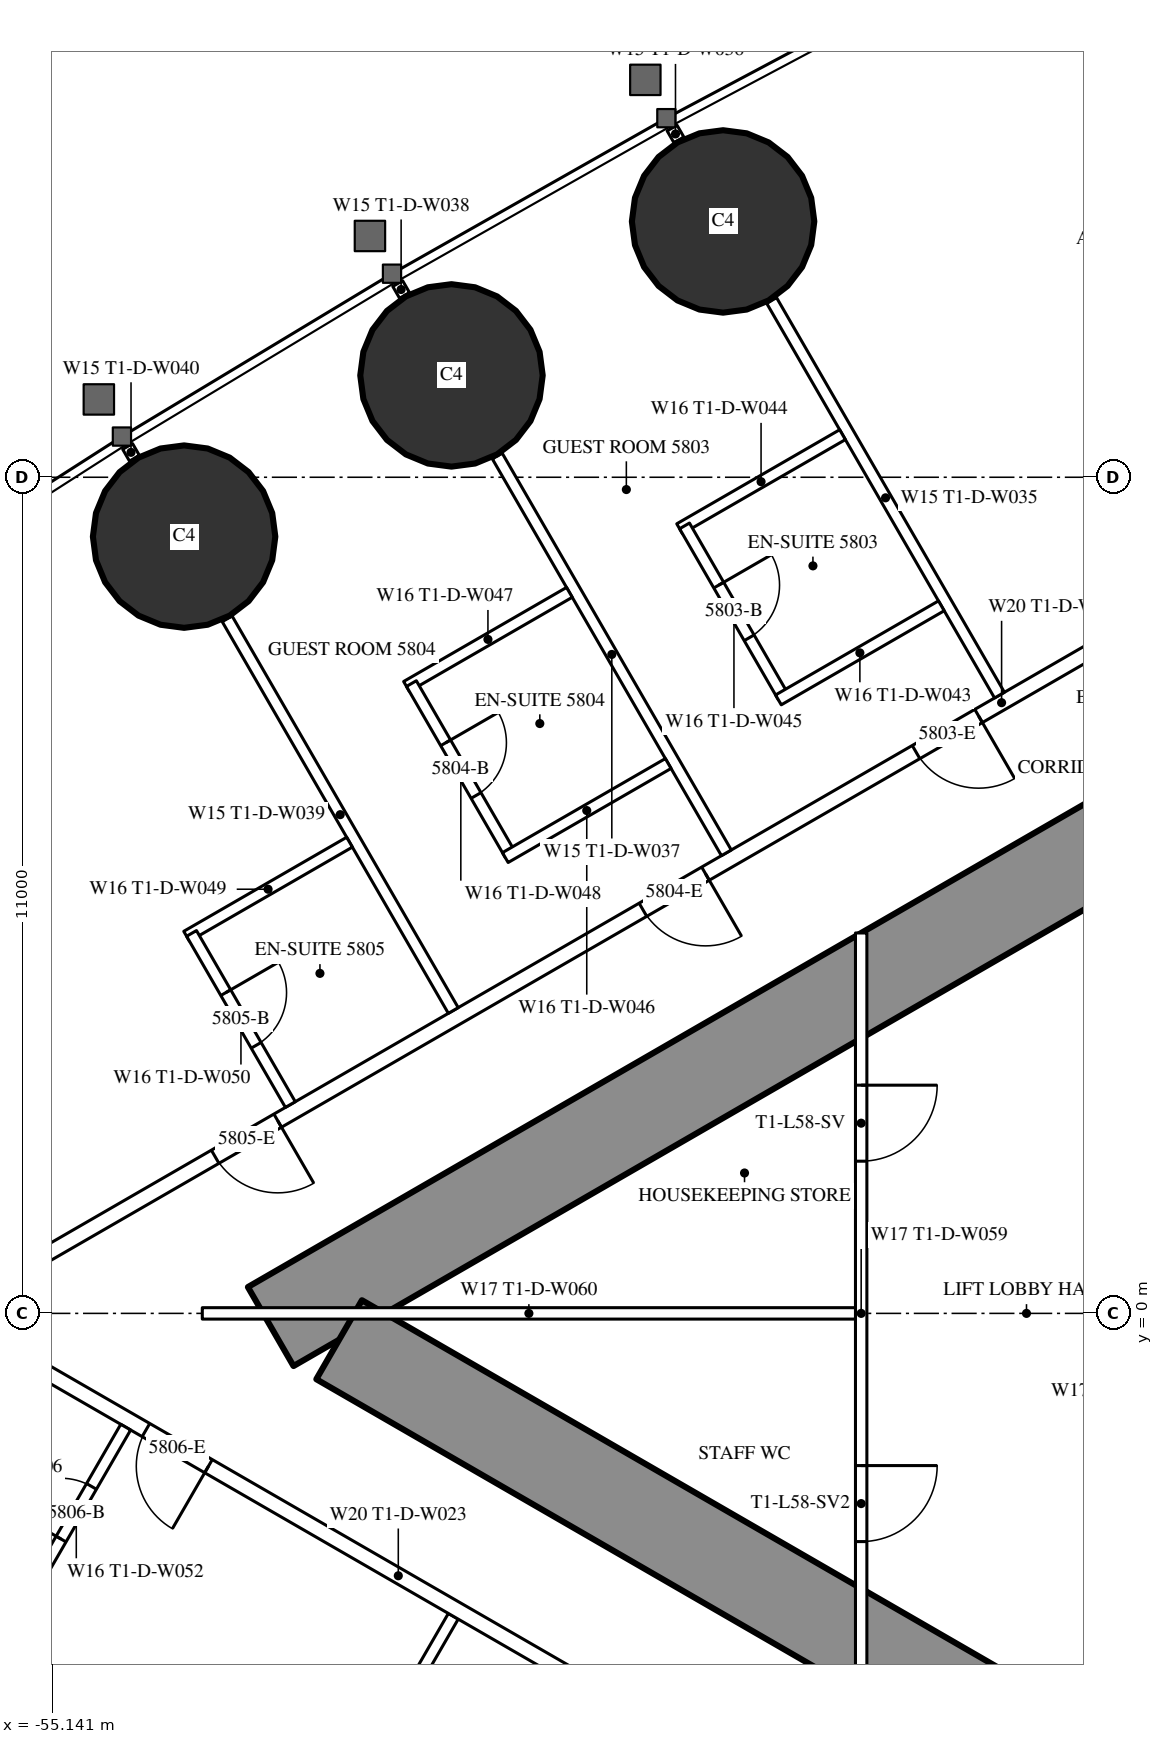
"""IFC4 building model, lengths in metres.
Left out: names, types, materials, properties, quantities, classifications, styles, units other than length and angle.
Written with IfcOpenShell. Run it as: python <this file> out.ifc"""

import sys

from ifc_helpers import new_model, si_unit, direction, frame, frame_2d, origin, origin_2d, place, context, subcontext, project, spatial, rectangle, circle, extrude, element, fill, save


model = new_model("IFC4")
c1 = context("Model", 3, precision=1e-05, world=origin(), true_north=direction((0.0, 1.0)))
c2 = subcontext(c1, "Body", "Model", "MODEL_VIEW")
j1 = project(units=[si_unit("LENGTHUNIT", "METRE"), si_unit("PLANEANGLEUNIT", "RADIAN")], contexts=[c1])
p1 = place(None, origin())
s1 = spatial("IfcSite", under=j1, at=p1, CompositionType="ELEMENT")
p2 = place(p1, origin())
s2 = spatial("IfcBuilding", under=s1, at=p2, CompositionType="ELEMENT")
p3 = place(p2, frame((0.0, 0.0, 218.9)))
s3 = spatial("IfcBuildingStorey", under=s2, at=p3, CompositionType="ELEMENT", Elevation=218.9)
for number, where, z_axis, x_axis in (
    (1, (-46.317, 14.365, 0.0), (0.0, 0.0, 1.0), (1.0, 0.0, 0.0)),
    (2, (-49.89, 12.34, 0.0), (0.0, 0.0, 1.0), (1.0, 0.0, 0.0)),
    (3, (-53.408, 10.219, 0.0), (0.0, 0.0, 1.0), (1.0, 0.0, 0.0)),
):
    element("IfcColumn", number, at=place(p3, frame(where, z_axis=z_axis, x_axis=x_axis)), inside=s3, PredefinedType="COLUMN", context=c2, shape_type="SweptSolid", body=[
        extrude(circle(Radius=1.2, at=origin_2d()), origin(), (0.0, 0.0, 1.0), 3.6),
    ])
p4 = place(p3, frame((-27.2, 14.3, 0.0), z_axis=(0.0, 0.0, 1.0), x_axis=(-0.866026593062, -0.499997940104, 0.0)))
e4 = element("IfcWall", 4, at=p4, inside=s3, PredefinedType="SHEAR", context=c2, shape_type="SweptSolid", body=[
    extrude(rectangle(XDim=28.946, YDim=1.2, at=frame_2d((14.473, 0.0))), origin(), (0.0, 0.0, 1.0), 3.6),
])
p5 = place(p4, frame((4.6, 0.0, 0.0)))
e5 = element("IfcOpeningElement", 5, at=p5, cuts=e4, PredefinedType="OPENING", context=c2, shape_type="SweptSolid", body=[
    extrude(rectangle(XDim=1.0, YDim=2.2, at=frame_2d((0.5, 1.1))), frame((0.0, 0.61, 0.0), z_axis=(0.0, -1.0, 0.0), x_axis=(1.0, 0.0, 0.0)), (0.0, 0.0, 1.0), 1.22),
])
p6 = place(p4, frame((13.395, 0.0, 0.0)))
e6 = element("IfcOpeningElement", 6, at=p6, cuts=e4, PredefinedType="OPENING", context=c2, shape_type="SweptSolid", body=[
    extrude(rectangle(XDim=1.8, YDim=2.2, at=frame_2d((0.9, 1.1))), frame((0.0, 0.61, 0.0), z_axis=(0.0, -1.0, 0.0), x_axis=(1.0, 0.0, 0.0)), (0.0, 0.0, 1.0), 1.22),
])
p7 = place(p3, frame((-27.2, -14.3, 0.0), z_axis=(0.0, 0.0, 1.0), x_axis=(-0.866024021859, 0.500002393557, 0.0)))
e7 = element("IfcWall", 7, at=p7, inside=s3, PredefinedType="SHEAR", context=c2, shape_type="SweptSolid", body=[
    extrude(rectangle(XDim=27.907, YDim=1.2, at=frame_2d((13.954, 0.0))), origin(), (0.0, 0.0, 1.0), 3.6),
])
p8 = place(p7, frame((4.6, 0.0, 0.0)))
e8 = element("IfcOpeningElement", 8, at=p8, cuts=e7, PredefinedType="OPENING", context=c2, shape_type="SweptSolid", body=[
    extrude(rectangle(XDim=1.0, YDim=2.2, at=frame_2d((0.5, 1.1))), frame((0.0, 0.61, 0.0), z_axis=(0.0, -1.0, 0.0), x_axis=(1.0, 0.0, 0.0)), (0.0, 0.0, 1.0), 1.22),
])
p9 = place(p7, frame((13.395, 0.0, 0.0)))
e9 = element("IfcOpeningElement", 9, at=p9, cuts=e7, PredefinedType="OPENING", context=c2, shape_type="SweptSolid", body=[
    extrude(rectangle(XDim=1.8, YDim=2.2, at=frame_2d((0.9, 1.1))), frame((0.0, 0.61, 0.0), z_axis=(0.0, -1.0, 0.0), x_axis=(1.0, 0.0, 0.0)), (0.0, 0.0, 1.0), 1.22),
])
p10 = place(p3, frame((-28.737, 16.068, 0.0), z_axis=(0.0, 0.0, 1.0), x_axis=(-0.866026057212, -0.499998868229, 0.0)))
e10 = element("IfcWall", 10, at=p10, inside=s3, PredefinedType="PARTITIONING", context=c2, shape_type="SweptSolid", body=[
    extrude(rectangle(XDim=32.137, YDim=0.2, at=frame_2d((16.068, 0.0))), origin(), (0.0, 0.0, 1.0), 3.35),
])
p11 = place(p10, frame((1.08, 0.0, 0.0)))
e11 = element("IfcOpeningElement", 11, at=p11, cuts=e10, PredefinedType="OPENING", context=c2, shape_type="SweptSolid", body=[
    extrude(rectangle(XDim=1.8, YDim=2.03, at=frame_2d((0.9, 1.015))), frame((0.0, 0.11, 0.0), z_axis=(0.0, -1.0, 0.0), x_axis=(1.0, 0.0, 0.0)), (0.0, 0.0, 1.0), 0.22),
])
p12 = place(p10, frame((6.86, 0.0, 0.0)))
e12 = element("IfcOpeningElement", 12, at=p12, cuts=e10, PredefinedType="OPENING", context=c2, shape_type="SweptSolid", body=[
    extrude(rectangle(XDim=1.0, YDim=2.2, at=frame_2d((0.5, 1.1))), frame((0.0, 0.11, 0.0), z_axis=(0.0, -1.0, 0.0), x_axis=(1.0, 0.0, 0.0)), (0.0, 0.0, 1.0), 0.22),
])
p13 = place(p10, frame((16.418, 0.0, 0.0)))
e13 = element("IfcOpeningElement", 13, at=p13, cuts=e10, PredefinedType="OPENING", context=c2, shape_type="SweptSolid", body=[
    extrude(rectangle(XDim=0.95, YDim=2.2, at=frame_2d((0.475, 1.1))), frame((0.0, 0.11, 0.0), z_axis=(0.0, -1.0, 0.0), x_axis=(1.0, 0.0, 0.0)), (0.0, 0.0, 1.0), 0.22),
])
p14 = place(p10, frame((20.567, 0.0, 0.0)))
e14 = element("IfcOpeningElement", 14, at=p14, cuts=e10, PredefinedType="OPENING", context=c2, shape_type="SweptSolid", body=[
    extrude(rectangle(XDim=0.95, YDim=2.2, at=frame_2d((0.475, 1.1))), frame((0.0, 0.11, 0.0), z_axis=(0.0, -1.0, 0.0), x_axis=(1.0, 0.0, 0.0)), (0.0, 0.0, 1.0), 0.22),
])
p15 = place(p10, frame((27.065, 0.0, 0.0)))
e15 = element("IfcOpeningElement", 15, at=p15, cuts=e10, PredefinedType="OPENING", context=c2, shape_type="SweptSolid", body=[
    extrude(rectangle(XDim=0.95, YDim=2.2, at=frame_2d((0.475, 1.1))), frame((0.0, 0.11, 0.0), z_axis=(0.0, -1.0, 0.0), x_axis=(1.0, 0.0, 0.0)), (0.0, 0.0, 1.0), 0.22),
])
p16 = place(p3, frame((-42.68, 8.134, 0.0), z_axis=(0.0, 0.0, 1.0), x_axis=(-0.499984479505, 0.866034364361, 0.0)))
e16 = element("IfcWall", 16, at=p16, inside=s3, PredefinedType="PARTITIONING", context=c2, shape_type="SweptSolid", body=[
    extrude(rectangle(XDim=5.995, YDim=0.15, at=frame_2d((2.998, 0.0))), origin(), (0.0, 0.0, 1.0), 2.45),
])
p17 = place(p3, frame((-46.898, 15.439, 0.0), z_axis=(0.0, 0.0, 1.0), x_axis=(-0.500232303069, 0.865891241997, 0.0)))
e17 = element("IfcWall", 17, at=p17, inside=s3, PredefinedType="PARTITIONING", context=c2, shape_type="SweptSolid", body=[
    extrude(rectangle(XDim=0.18, YDim=0.15, at=frame_2d((0.09, 0.0))), origin(), (0.0, 0.0, 1.0), 2.45),
])
p18 = place(p3, frame((-46.274, 6.059, 0.0), z_axis=(0.0, 0.0, 1.0), x_axis=(-0.500020471368, 0.866013584312, 0.0)))
e18 = element("IfcWall", 18, at=p18, inside=s3, PredefinedType="PARTITIONING", context=c2, shape_type="SweptSolid", body=[
    extrude(rectangle(XDim=6.028, YDim=0.15, at=frame_2d((3.014, 0.0))), origin(), (0.0, 0.0, 1.0), 2.45),
])
p19 = place(p3, frame((-50.508, 13.392, 0.0), z_axis=(0.0, 0.0, 1.0), x_axis=(-0.499644091975, 0.866230789891, 0.0)))
e19 = element("IfcWall", 19, at=p19, inside=s3, PredefinedType="PARTITIONING", context=c2, shape_type="SweptSolid", body=[
    extrude(rectangle(XDim=0.18, YDim=0.15, at=frame_2d((0.09, 0.0))), origin(), (0.0, 0.0, 1.0), 2.45),
])
p20 = place(p3, frame((-49.866, 3.985, 0.0), z_axis=(0.0, 0.0, 1.0), x_axis=(-0.500000694566, 0.866025002776, 0.0)))
e20 = element("IfcWall", 20, at=p20, inside=s3, PredefinedType="PARTITIONING", context=c2, shape_type="SweptSolid", body=[
    extrude(rectangle(XDim=5.95, YDim=0.15, at=frame_2d((2.975, 0.0))), origin(), (0.0, 0.0, 1.0), 2.45),
])
p21 = place(p3, frame((-54.061, 11.25, 0.0), z_axis=(0.0, 0.0, 1.0), x_axis=(-0.500391173478, 0.865799441849, 0.0)))
e21 = element("IfcWall", 21, at=p21, inside=s3, PredefinedType="PARTITIONING", context=c2, shape_type="SweptSolid", body=[
    extrude(rectangle(XDim=0.179, YDim=0.15, at=frame_2d((0.089, 0.0))), origin(), (0.0, 0.0, 1.0), 2.45),
])
p22 = place(p3, frame((-49.866, -3.985, 0.0), z_axis=(0.0, 0.0, 1.0), x_axis=(-0.500000694566, -0.866025002776, 0.0)))
e22 = element("IfcWall", 22, at=p22, inside=s3, PredefinedType="PARTITIONING", context=c2, shape_type="SweptSolid", body=[
    extrude(rectangle(XDim=5.95, YDim=0.15, at=frame_2d((2.975, 0.0))), origin(), (0.0, 0.0, 1.0), 2.45),
])
p23 = place(p22, frame((3.5, 0.0, 0.0)))
e23 = element("IfcOpeningElement", 23, at=p23, cuts=e22, PredefinedType="OPENING", context=c2, shape_type="SweptSolid", body=[
    extrude(rectangle(XDim=0.9, YDim=2.2, at=frame_2d((0.45, 1.1))), frame((0.0, 0.085, 0.0), z_axis=(0.0, -1.0, 0.0), x_axis=(1.0, 0.0, 0.0)), (0.0, 0.0, 1.0), 0.17),
])
p24 = place(p3, frame((-44.715, -6.844, 0.0), z_axis=(0.0, 0.0, 1.0), x_axis=(-0.866025261224, 0.500000246922, 0.0)))
e24 = element("IfcWall", 24, at=p24, inside=s3, PredefinedType="PARTITIONING", context=c2, shape_type="SweptSolid", body=[
    extrude(rectangle(XDim=13.567, YDim=0.2, at=frame_2d((6.783, 0.0))), origin(), (0.0, 0.0, 1.0), 3.35),
])
p25 = place(p24, frame((9.667, 0.0, 0.0)))
e25 = element("IfcOpeningElement", 25, at=p25, cuts=e24, PredefinedType="OPENING", context=c2, shape_type="SweptSolid", body=[
    extrude(rectangle(XDim=0.95, YDim=2.2, at=frame_2d((0.475, 1.1))), frame((0.0, 0.11, 0.0), z_axis=(0.0, -1.0, 0.0), x_axis=(1.0, 0.0, 0.0)), (0.0, 0.0, 1.0), 0.22),
])
p26 = place(p24, frame((2.117, 0.0, 0.0)))
e26 = element("IfcOpeningElement", 26, at=p26, cuts=e24, PredefinedType="OPENING", context=c2, shape_type="SweptSolid", body=[
    extrude(rectangle(XDim=0.95, YDim=2.2, at=frame_2d((0.475, 1.1))), frame((0.0, 0.11, 0.0), z_axis=(0.0, -1.0, 0.0), x_axis=(1.0, 0.0, 0.0)), (0.0, 0.0, 1.0), 0.22),
])
p27 = place(p24, frame((0.5, 0.0, 0.0)))
e27 = element("IfcOpeningElement", 27, at=p27, cuts=e24, PredefinedType="OPENING", context=c2, shape_type="SweptSolid", body=[
    extrude(rectangle(XDim=0.967, YDim=2.2, at=frame_2d((0.483, 1.1))), frame((0.0, 0.11, 0.0), z_axis=(0.0, -1.0, 0.0), x_axis=(1.0, 0.0, 0.0)), (0.0, 0.0, 1.0), 0.22),
])
p28 = place(p3, frame((-44.745, 11.56, 0.0), z_axis=(0.0, 0.0, 1.0), x_axis=(-0.866006523861, -0.500032699561, 0.0)))
e28 = element("IfcWall", 28, at=p28, inside=s3, PredefinedType="PARTITIONING", context=c2, shape_type="SweptSolid", body=[
    extrude(rectangle(XDim=2.475, YDim=0.15, at=frame_2d((1.237, 0.0))), origin(), (0.0, 0.0, 1.0), 3.35),
])
p29 = place(p3, frame((-45.524, 8.109, 0.0), z_axis=(0.0, 0.0, 1.0), x_axis=(-0.49997716683, 0.86603858612, 0.0)))
e29 = element("IfcWall", 29, at=p29, inside=s3, PredefinedType="PARTITIONING", context=c2, shape_type="SweptSolid", body=[
    extrude(rectangle(XDim=2.6, YDim=0.15, at=frame_2d((1.3, 0.0))), origin(), (0.0, 0.0, 1.0), 3.35),
])
p30 = place(p29, frame((0.9, 0.0, 0.0)))
e30 = element("IfcOpeningElement", 30, at=p30, cuts=e29, PredefinedType="OPENING", context=c2, shape_type="SweptSolid", body=[
    extrude(rectangle(XDim=0.8, YDim=2.2, at=frame_2d((0.4, 1.1))), frame((0.0, 0.085, 0.0), z_axis=(0.0, -1.0, 0.0), x_axis=(1.0, 0.0, 0.0)), (0.0, 0.0, 1.0), 0.17),
])
p31 = place(p3, frame((-43.445, 9.309, 0.0), z_axis=(0.0, 0.0, 1.0), x_axis=(-0.866031185235, -0.4999899861, 0.0)))
e31 = element("IfcWall", 31, at=p31, inside=s3, PredefinedType="PARTITIONING", context=c2, shape_type="SweptSolid", body=[
    extrude(rectangle(XDim=2.475, YDim=0.15, at=frame_2d((1.238, 0.0))), origin(), (0.0, 0.0, 1.0), 3.35),
])
p32 = place(p3, frame((-48.339, 9.486, 0.0), z_axis=(0.0, 0.0, 1.0), x_axis=(-0.866006523861, -0.500032699561, 0.0)))
e32 = element("IfcWall", 32, at=p32, inside=s3, PredefinedType="PARTITIONING", context=c2, shape_type="SweptSolid", body=[
    extrude(rectangle(XDim=2.475, YDim=0.15, at=frame_2d((1.237, 0.0))), origin(), (0.0, 0.0, 1.0), 3.35),
])
p33 = place(p3, frame((-49.117, 6.034, 0.0), z_axis=(0.0, 0.0, 1.0), x_axis=(-0.500006934395, 0.866021400173, 0.0)))
e33 = element("IfcWall", 33, at=p33, inside=s3, PredefinedType="PARTITIONING", context=c2, shape_type="SweptSolid", body=[
    extrude(rectangle(XDim=2.6, YDim=0.15, at=frame_2d((1.3, 0.0))), origin(), (0.0, 0.0, 1.0), 3.35),
])
p34 = place(p33, frame((0.9, 0.0, 0.0)))
e34 = element("IfcOpeningElement", 34, at=p34, cuts=e33, PredefinedType="OPENING", context=c2, shape_type="SweptSolid", body=[
    extrude(rectangle(XDim=0.8, YDim=2.2, at=frame_2d((0.4, 1.1))), frame((0.0, 0.085, 0.0), z_axis=(0.0, -1.0, 0.0), x_axis=(1.0, 0.0, 0.0)), (0.0, 0.0, 1.0), 0.17),
])
for number, where, z_axis, x_axis in (
    (35, (-47.039, 7.234, 0.0), (0.0, 0.0, 1.0), (-0.866, -0.5, 0.0)),
    (36, (-51.231, 6.199, 0.0), (0.0, 0.0, 1.0), (-0.866, -0.5, 0.0)),
):
    element("IfcWall", number, at=place(p3, frame(where, z_axis=z_axis, x_axis=x_axis)), inside=s3, PredefinedType="PARTITIONING", context=c2, shape_type="SweptSolid", body=[
        extrude(rectangle(XDim=2.475, YDim=0.15, at=frame_2d((1.238, 0.0))), origin(), (0.0, 0.0, 1.0), 3.35),
    ])
p35 = place(p3, frame((-52.01, 2.747, 0.0), z_axis=(0.0, 0.0, 1.0), x_axis=(-0.500006934395, 0.866021400173, 0.0)))
e37 = element("IfcWall", 37, at=p35, inside=s3, PredefinedType="PARTITIONING", context=c2, shape_type="SweptSolid", body=[
    extrude(rectangle(XDim=2.6, YDim=0.15, at=frame_2d((1.3, 0.0))), origin(), (0.0, 0.0, 1.0), 3.35),
])
p36 = place(p35, frame((0.9, 0.0, 0.0)))
e38 = element("IfcOpeningElement", 38, at=p36, cuts=e37, PredefinedType="OPENING", context=c2, shape_type="SweptSolid", body=[
    extrude(rectangle(XDim=0.8, YDim=2.2, at=frame_2d((0.4, 1.1))), frame((0.0, 0.085, 0.0), z_axis=(0.0, -1.0, 0.0), x_axis=(1.0, 0.0, 0.0)), (0.0, 0.0, 1.0), 0.17),
])
p37 = place(p3, frame((-54.176, -1.497, 0.0), z_axis=(0.0, 0.0, 1.0), x_axis=(-0.500006934395, -0.866021400173, 0.0)))
e39 = element("IfcWall", 39, at=p37, inside=s3, PredefinedType="PARTITIONING", context=c2, shape_type="SweptSolid", body=[
    extrude(rectangle(XDim=2.6, YDim=0.15, at=frame_2d((1.3, 0.0))), origin(), (0.0, 0.0, 1.0), 3.35),
])
p38 = place(p37, frame((0.9, 0.0, 0.0)))
e40 = element("IfcOpeningElement", 40, at=p38, cuts=e39, PredefinedType="OPENING", context=c2, shape_type="SweptSolid", body=[
    extrude(rectangle(XDim=0.8, YDim=2.2, at=frame_2d((0.4, 1.1))), frame((0.0, 0.085, 0.0), z_axis=(0.0, -1.0, 0.0), x_axis=(1.0, 0.0, 0.0)), (0.0, 0.0, 1.0), 0.17),
])
p39 = place(p3, frame((-44.5, 5.005, 0.0), z_axis=(0.0, 0.0, 1.0), x_axis=(0.0, -1.0, 0.0)))
e41 = element("IfcWall", 41, at=p39, inside=s3, PredefinedType="PARTITIONING", context=c2, shape_type="SweptSolid", body=[
    extrude(rectangle(XDim=10.009, YDim=0.15, at=frame_2d((5.005, 0.0))), origin(), (0.0, 0.0, 1.0), 2.5),
])
p40 = place(p39, frame((2.002, 0.0, 0.0)))
e42 = element("IfcOpeningElement", 42, at=p40, cuts=e41, PredefinedType="OPENING", context=c2, shape_type="SweptSolid", body=[
    extrude(rectangle(XDim=1.0, YDim=2.2, at=frame_2d((0.5, 1.1))), frame((0.0, 0.085, 0.0), z_axis=(0.0, -1.0, 0.0), x_axis=(1.0, 0.0, 0.0)), (0.0, 0.0, 1.0), 0.17),
])
p41 = place(p39, frame((7.007, 0.0, 0.0)))
e43 = element("IfcOpeningElement", 43, at=p41, cuts=e41, PredefinedType="OPENING", context=c2, shape_type="SweptSolid", body=[
    extrude(rectangle(XDim=1.0, YDim=2.2, at=frame_2d((0.5, 1.1))), frame((0.0, 0.085, 0.0), z_axis=(0.0, -1.0, 0.0), x_axis=(1.0, 0.0, 0.0)), (0.0, 0.0, 1.0), 0.17),
])
p42 = place(p3, frame((-44.575, 0.0, 0.0), z_axis=(0.0, 0.0, 1.0), x_axis=(-1.0, 0.0, 0.0)))
e44 = element("IfcWall", 44, at=p42, inside=s3, PredefinedType="PARTITIONING", context=c2, shape_type="SweptSolid", body=[
    extrude(rectangle(XDim=8.593, YDim=0.15, at=frame_2d((4.297, 0.0))), origin(), (0.0, 0.0, 1.0), 2.45),
])
p43 = place(p30, origin())
e45 = element("IfcDoor", 45, at=p43, inside=s3, OperationType="SINGLE_SWING_RIGHT", PredefinedType="DOOR", context=c2, shape_type="SweptSolid", body=[
    extrude(rectangle(XDim=0.8, YDim=2.2, at=frame_2d((0.4, 1.1))), frame((0.0, 0.025, 0.0), z_axis=(0.0, -1.0, 0.0), x_axis=(1.0, 0.0, 0.0)), (0.0, 0.0, 1.0), 0.05),
])
fill(e30, e45)
p44 = place(p13, origin())
e46 = element("IfcDoor", 46, at=p44, inside=s3, OperationType="SINGLE_SWING_LEFT", PredefinedType="DOOR", context=c2, shape_type="SweptSolid", body=[
    extrude(rectangle(XDim=0.95, YDim=2.2, at=frame_2d((0.475, 1.1))), frame((0.0, 0.025, 0.0), z_axis=(0.0, -1.0, 0.0), x_axis=(1.0, 0.0, 0.0)), (0.0, 0.0, 1.0), 0.05),
])
fill(e13, e46)
p45 = place(p34, origin())
e47 = element("IfcDoor", 47, at=p45, inside=s3, OperationType="SINGLE_SWING_RIGHT", PredefinedType="DOOR", context=c2, shape_type="SweptSolid", body=[
    extrude(rectangle(XDim=0.8, YDim=2.2, at=frame_2d((0.4, 1.1))), frame((0.0, 0.025, 0.0), z_axis=(0.0, -1.0, 0.0), x_axis=(1.0, 0.0, 0.0)), (0.0, 0.0, 1.0), 0.05),
])
fill(e34, e47)
p46 = place(p14, origin())
e48 = element("IfcDoor", 48, at=p46, inside=s3, OperationType="SINGLE_SWING_LEFT", PredefinedType="DOOR", context=c2, shape_type="SweptSolid", body=[
    extrude(rectangle(XDim=0.95, YDim=2.2, at=frame_2d((0.475, 1.1))), frame((0.0, 0.025, 0.0), z_axis=(0.0, -1.0, 0.0), x_axis=(1.0, 0.0, 0.0)), (0.0, 0.0, 1.0), 0.05),
])
fill(e14, e48)
p47 = place(p36, origin())
e49 = element("IfcDoor", 49, at=p47, inside=s3, OperationType="SINGLE_SWING_RIGHT", PredefinedType="DOOR", context=c2, shape_type="SweptSolid", body=[
    extrude(rectangle(XDim=0.8, YDim=2.2, at=frame_2d((0.4, 1.1))), frame((0.0, 0.025, 0.0), z_axis=(0.0, -1.0, 0.0), x_axis=(1.0, 0.0, 0.0)), (0.0, 0.0, 1.0), 0.05),
])
fill(e38, e49)
p48 = place(p15, origin())
e50 = element("IfcDoor", 50, at=p48, inside=s3, OperationType="SINGLE_SWING_LEFT", PredefinedType="DOOR", context=c2, shape_type="SweptSolid", body=[
    extrude(rectangle(XDim=0.95, YDim=2.2, at=frame_2d((0.475, 1.1))), frame((0.0, 0.025, 0.0), z_axis=(0.0, -1.0, 0.0), x_axis=(1.0, 0.0, 0.0)), (0.0, 0.0, 1.0), 0.05),
])
fill(e15, e50)
p49 = place(p38, origin())
e51 = element("IfcDoor", 51, at=p49, inside=s3, OperationType="SINGLE_SWING_RIGHT", PredefinedType="DOOR", context=c2, shape_type="SweptSolid", body=[
    extrude(rectangle(XDim=0.8, YDim=2.2, at=frame_2d((0.4, 1.1))), frame((0.0, 0.025, 0.0), z_axis=(0.0, -1.0, 0.0), x_axis=(1.0, 0.0, 0.0)), (0.0, 0.0, 1.0), 0.05),
])
fill(e40, e51)
p50 = place(p25, origin())
e52 = element("IfcDoor", 52, at=p50, inside=s3, OperationType="SINGLE_SWING_LEFT", PredefinedType="DOOR", context=c2, shape_type="SweptSolid", body=[
    extrude(rectangle(XDim=0.95, YDim=2.2, at=frame_2d((0.475, 1.1))), frame((0.0, 0.025, 0.0), z_axis=(0.0, -1.0, 0.0), x_axis=(1.0, 0.0, 0.0)), (0.0, 0.0, 1.0), 0.05),
])
fill(e25, e52)
p51 = place(p40, origin())
e53 = element("IfcDoor", 53, at=p51, inside=s3, OperationType="SINGLE_SWING_LEFT", PredefinedType="DOOR", context=c2, shape_type="SweptSolid", body=[
    extrude(rectangle(XDim=1.0, YDim=2.2, at=frame_2d((0.5, 1.1))), frame((0.0, 0.025, 0.0), z_axis=(0.0, -1.0, 0.0), x_axis=(1.0, 0.0, 0.0)), (0.0, 0.0, 1.0), 0.05),
])
fill(e42, e53)
p52 = place(p41, origin())
e54 = element("IfcDoor", 54, at=p52, inside=s3, OperationType="SINGLE_SWING_LEFT", PredefinedType="DOOR", context=c2, shape_type="SweptSolid", body=[
    extrude(rectangle(XDim=1.0, YDim=2.2, at=frame_2d((0.5, 1.1))), frame((0.0, 0.025, 0.0), z_axis=(0.0, -1.0, 0.0), x_axis=(1.0, 0.0, 0.0)), (0.0, 0.0, 1.0), 0.05),
])
fill(e43, e54)
save(model, sys.argv[1])
